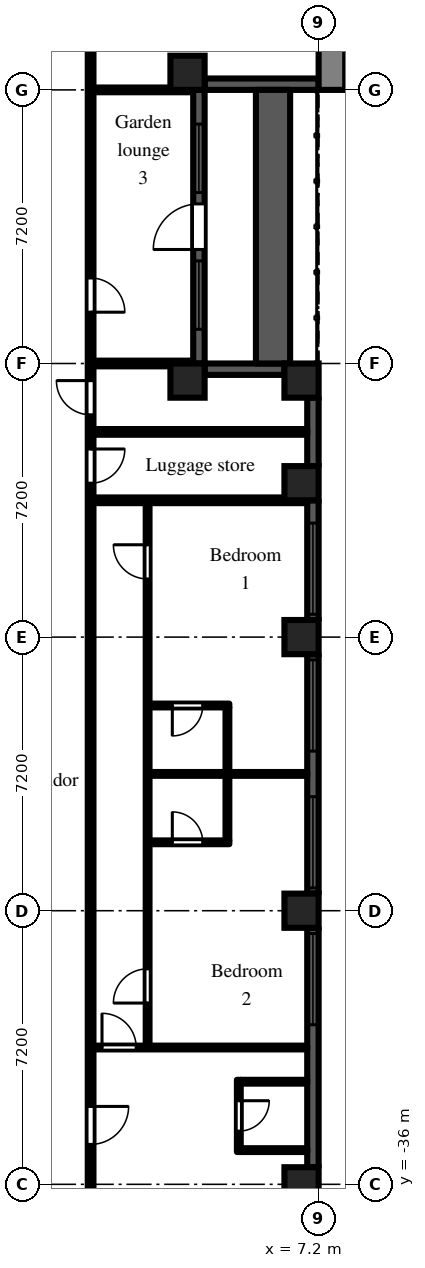
"""IFC4 building model, lengths in metres.
Left out: names, types, materials, properties, quantities, classifications, styles, units other than length and angle.
Written with IfcOpenShell. Run it as: python <this file> out.ifc"""

import sys

from ifc_helpers import new_model, si_unit, direction, frame, frame_2d, origin, origin_2d, place, context, subcontext, project, spatial, rectangle, extrude, element, fill, save


model = new_model("IFC4")
c1 = context("Model", 3, precision=1e-05, world=origin(), true_north=direction((0.0, 1.0)))
c2 = subcontext(c1, "Body", "Model", "MODEL_VIEW")
j1 = project(units=[si_unit("LENGTHUNIT", "METRE"), si_unit("PLANEANGLEUNIT", "RADIAN")], contexts=[c1])
p1 = place(None, origin())
s1 = spatial("IfcSite", under=j1, at=p1, CompositionType="ELEMENT")
p2 = place(p1, origin())
s2 = spatial("IfcBuilding", under=s1, at=p2, CompositionType="ELEMENT")
p3 = place(p2, frame((0.0, 0.0, 102.9)))
s3 = spatial("IfcBuildingStorey", under=s2, at=p3, CompositionType="ELEMENT", Elevation=102.9)
for number, where, z_axis, x_axis in (
    (1, (3.75, -14.85, 0.0), (0.0, 0.0, 1.0), (1.0, 0.0, 0.0)),
    (2, (3.75, -6.75, 0.0), (0.0, 0.0, 1.0), (1.0, 0.0, 0.0)),
    (3, (6.75, -36.0, 0.0), (0.0, 0.0, 1.0), (1.0, 0.0, 0.0)),
    (4, (6.75, -28.8, 0.0), (0.0, 0.0, 1.0), (1.0, 0.0, 0.0)),
    (5, (6.75, -21.6, 0.0), (0.0, 0.0, 1.0), (1.0, 0.0, 0.0)),
    (6, (6.75, -17.55, 0.0), (0.0, 0.0, 1.0), (1.0, 0.0, 0.0)),
    (7, (6.75, -14.85, 0.0), (0.0, 0.0, 1.0), (1.0, 0.0, 0.0)),
):
    element("IfcColumn", number, at=place(p3, frame(where, z_axis=z_axis, x_axis=x_axis)), inside=s3, PredefinedType="COLUMN", context=c2, shape_type="SweptSolid", body=[
        extrude(rectangle(XDim=0.9, YDim=0.9, at=origin_2d()), origin(), (0.0, 0.0, 1.0), 3.0),
    ])
p4 = place(p3, frame((7.05, -35.55, 0.0), z_axis=(0.0, 0.0, 1.0), x_axis=(0.0, 1.0, 0.0)))
e8 = element("IfcWall", 8, at=p4, inside=s3, PredefinedType="SOLIDWALL", context=c2, shape_type="SweptSolid", body=[
    extrude(rectangle(XDim=6.3, YDim=0.3, at=frame_2d((3.15, 0.0))), origin(), (0.0, 0.0, 1.0), 2.1),
])
p5 = place(p4, frame((3.75, 0.0, 0.2)))
e9 = element("IfcOpeningElement", 9, at=p5, cuts=e8, PredefinedType="OPENING", context=c2, shape_type="SweptSolid", body=[
    extrude(rectangle(XDim=2.4, YDim=1.85, at=frame_2d((1.2, 0.925))), frame((0.0, 0.16, 0.0), z_axis=(0.0, -1.0, 0.0), x_axis=(1.0, 0.0, 0.0)), (0.0, 0.0, 1.0), 0.32),
])
p6 = place(p3, frame((7.05, -28.35, 0.0), z_axis=(0.0, 0.0, 1.0), x_axis=(0.0, 1.0, 0.0)))
e10 = element("IfcWall", 10, at=p6, inside=s3, PredefinedType="SOLIDWALL", context=c2, shape_type="SweptSolid", body=[
    extrude(rectangle(XDim=6.3, YDim=0.3, at=frame_2d((3.15, 0.0))), origin(), (0.0, 0.0, 1.0), 2.1),
])
p7 = place(p6, frame((0.15, 0.0, 0.2)))
e11 = element("IfcOpeningElement", 11, at=p7, cuts=e10, PredefinedType="OPENING", context=c2, shape_type="SweptSolid", body=[
    extrude(rectangle(XDim=2.4, YDim=1.85, at=frame_2d((1.2, 0.925))), frame((0.0, 0.16, 0.0), z_axis=(0.0, -1.0, 0.0), x_axis=(1.0, 0.0, 0.0)), (0.0, 0.0, 1.0), 0.32),
])
p8 = place(p6, frame((3.75, 0.0, 0.2)))
e12 = element("IfcOpeningElement", 12, at=p8, cuts=e10, PredefinedType="OPENING", context=c2, shape_type="SweptSolid", body=[
    extrude(rectangle(XDim=2.4, YDim=1.85, at=frame_2d((1.2, 0.925))), frame((0.0, 0.16, 0.0), z_axis=(0.0, -1.0, 0.0), x_axis=(1.0, 0.0, 0.0)), (0.0, 0.0, 1.0), 0.32),
])
p9 = place(p3, frame((7.05, -21.15, 0.0), z_axis=(0.0, 0.0, 1.0), x_axis=(0.0, 1.0, 0.0)))
e13 = element("IfcWall", 13, at=p9, inside=s3, PredefinedType="SOLIDWALL", context=c2, shape_type="SweptSolid", body=[
    extrude(rectangle(XDim=3.15, YDim=0.3, at=frame_2d((1.575, 0.0))), origin(), (0.0, 0.0, 1.0), 2.1),
])
p10 = place(p9, frame((0.15, 0.0, 0.2)))
e14 = element("IfcOpeningElement", 14, at=p10, cuts=e13, PredefinedType="OPENING", context=c2, shape_type="SweptSolid", body=[
    extrude(rectangle(XDim=2.4, YDim=1.85, at=frame_2d((1.2, 0.925))), frame((0.0, 0.16, 0.0), z_axis=(0.0, -1.0, 0.0), x_axis=(1.0, 0.0, 0.0)), (0.0, 0.0, 1.0), 0.32),
])
p11 = place(p3, frame((7.05, -17.1, 0.0), z_axis=(0.0, 0.0, 1.0), x_axis=(0.0, 1.0, 0.0)))
e15 = element("IfcWall", 15, at=p11, inside=s3, PredefinedType="SOLIDWALL", context=c2, shape_type="SweptSolid", body=[
    extrude(rectangle(XDim=1.8, YDim=0.3, at=frame_2d((0.9, 0.0))), origin(), (0.0, 0.0, 1.0), 2.1),
])
p12 = place(p3, frame((6.3, -14.55, 0.0), z_axis=(0.0, 0.0, 1.0), x_axis=(-1.0, 0.0, 0.0)))
e16 = element("IfcWall", 16, at=p12, inside=s3, PredefinedType="SOLIDWALL", context=c2, shape_type="SweptSolid", body=[
    extrude(rectangle(XDim=2.1, YDim=0.3, at=frame_2d((1.05, 0.0))), origin(), (0.0, 0.0, 1.0), 2.1),
])
p13 = place(p3, frame((4.05, -14.4, 0.0), z_axis=(0.0, 0.0, 1.0), x_axis=(0.0, 1.0, 0.0)))
e17 = element("IfcWall", 17, at=p13, inside=s3, PredefinedType="SOLIDWALL", context=c2, shape_type="SweptSolid", body=[
    extrude(rectangle(XDim=7.2, YDim=0.3, at=frame_2d((3.6, 0.0))), origin(), (0.0, 0.0, 1.0), 2.1),
])
p14 = place(p13, frame((3.0, 0.0, 0.0)))
e18 = element("IfcOpeningElement", 18, at=p14, cuts=e17, PredefinedType="OPENING", context=c2, shape_type="SweptSolid", body=[
    extrude(rectangle(XDim=1.2, YDim=2.05, at=frame_2d((0.6, 1.025))), frame((0.0, 0.16, 0.0), z_axis=(0.0, -1.0, 0.0), x_axis=(1.0, 0.0, 0.0)), (0.0, 0.0, 1.0), 0.32),
])
p15 = place(p13, frame((0.9, 0.0, 0.2)))
e19 = element("IfcOpeningElement", 19, at=p15, cuts=e17, PredefinedType="OPENING", context=c2, shape_type="SweptSolid", body=[
    extrude(rectangle(XDim=1.8, YDim=1.85, at=frame_2d((0.9, 0.925))), frame((0.0, 0.16, 0.0), z_axis=(0.0, -1.0, 0.0), x_axis=(1.0, 0.0, 0.0)), (0.0, 0.0, 1.0), 0.32),
])
p16 = place(p13, frame((4.5, 0.0, 0.2)))
e20 = element("IfcOpeningElement", 20, at=p16, cuts=e17, PredefinedType="OPENING", context=c2, shape_type="SweptSolid", body=[
    extrude(rectangle(XDim=1.8, YDim=1.85, at=frame_2d((0.9, 0.925))), frame((0.0, 0.16, 0.0), z_axis=(0.0, -1.0, 0.0), x_axis=(1.0, 0.0, 0.0)), (0.0, 0.0, 1.0), 0.32),
])
p17 = place(p3, frame((4.2, -7.05, 0.0), z_axis=(0.0, 0.0, 1.0), x_axis=(1.0, 0.0, 0.0)))
e21 = element("IfcWall", 21, at=p17, inside=s3, PredefinedType="SOLIDWALL", context=c2, shape_type="SweptSolid", body=[
    extrude(rectangle(XDim=3.0, YDim=0.3, at=frame_2d((1.5, 0.0))), origin(), (0.0, 0.0, 1.0), 2.1),
])
p18 = place(p3, frame((6.0, -14.4, 0.0), z_axis=(0.0, 0.0, 1.0), x_axis=(0.0, 1.0, 0.0)))
e22 = element("IfcWall", 22, at=p18, inside=s3, PredefinedType="PARAPET", context=c2, shape_type="SweptSolid", body=[
    extrude(rectangle(XDim=7.2, YDim=0.9, at=frame_2d((3.6, 0.0))), origin(), (0.0, 0.0, 1.0), 0.8),
])
p19 = place(p3, frame((7.55, -7.2, 0.0), z_axis=(0.0, 0.0, 1.0), x_axis=(0.0, 1.0, 0.0)))
e23 = element("IfcWall", 23, at=p19, inside=s3, PredefinedType="SHEAR", context=c2, shape_type="SweptSolid", body=[
    extrude(rectangle(XDim=14.4, YDim=0.7, at=frame_2d((7.2, 0.0))), origin(), (0.0, 0.0, 1.0), 2.575),
])
p20 = place(p19, frame((6.0, 0.0, 0.0)))
e24 = element("IfcOpeningElement", 24, at=p20, cuts=e23, PredefinedType="OPENING", context=c2, shape_type="SweptSolid", body=[
    extrude(rectangle(XDim=2.4, YDim=2.2, at=frame_2d((1.2, 1.1))), frame((0.0, 0.36, 0.0), z_axis=(0.0, -1.0, 0.0), x_axis=(1.0, 0.0, 0.0)), (0.0, 0.0, 1.0), 0.72),
])
p21 = place(p3, frame((1.2, -36.5, 0.0), z_axis=(0.0, 0.0, 1.0), x_axis=(0.0, 1.0, 0.0)))
e25 = element("IfcWall", 25, at=p21, inside=s3, PredefinedType="PARTITIONING", context=c2, shape_type="SweptSolid", body=[
    extrude(rectangle(XDim=35.375, YDim=0.15, at=frame_2d((17.688, 0.0))), origin(), (0.0, 0.0, 1.0), 2.575),
])
p22 = place(p21, frame((33.65, 0.0, 0.0)))
e26 = element("IfcOpeningElement", 26, at=p22, cuts=e25, PredefinedType="OPENING", context=c2, shape_type="SweptSolid", body=[
    extrude(rectangle(XDim=0.9, YDim=2.1, at=frame_2d((0.45, 1.05))), frame((0.0, 0.085, 0.0), z_axis=(0.0, -1.0, 0.0), x_axis=(1.0, 0.0, 0.0)), (0.0, 0.0, 1.0), 0.17),
])
p23 = place(p21, frame((30.65, 0.0, 0.0)))
e27 = element("IfcOpeningElement", 27, at=p23, cuts=e25, PredefinedType="OPENING", context=c2, shape_type="SweptSolid", body=[
    extrude(rectangle(XDim=0.9, YDim=2.1, at=frame_2d((0.45, 1.05))), frame((0.0, 0.085, 0.0), z_axis=(0.0, -1.0, 0.0), x_axis=(1.0, 0.0, 0.0)), (0.0, 0.0, 1.0), 0.17),
])
p24 = place(p21, frame((23.45, 0.0, 0.0)))
e28 = element("IfcOpeningElement", 28, at=p24, cuts=e25, PredefinedType="OPENING", context=c2, shape_type="SweptSolid", body=[
    extrude(rectangle(XDim=0.9, YDim=2.1, at=frame_2d((0.45, 1.05))), frame((0.0, 0.085, 0.0), z_axis=(0.0, -1.0, 0.0), x_axis=(1.0, 0.0, 0.0)), (0.0, 0.0, 1.0), 0.17),
])
p25 = place(p21, frame((20.75, 0.0, 0.0)))
e29 = element("IfcOpeningElement", 29, at=p25, cuts=e25, PredefinedType="OPENING", context=c2, shape_type="SweptSolid", body=[
    extrude(rectangle(XDim=0.9, YDim=2.1, at=frame_2d((0.45, 1.05))), frame((0.0, 0.085, 0.0), z_axis=(0.0, -1.0, 0.0), x_axis=(1.0, 0.0, 0.0)), (0.0, 0.0, 1.0), 0.17),
])
p26 = place(p21, frame((18.95, 0.0, 0.0)))
e30 = element("IfcOpeningElement", 30, at=p26, cuts=e25, PredefinedType="OPENING", context=c2, shape_type="SweptSolid", body=[
    extrude(rectangle(XDim=0.9, YDim=2.1, at=frame_2d((0.45, 1.05))), frame((0.0, 0.085, 0.0), z_axis=(0.0, -1.0, 0.0), x_axis=(1.0, 0.0, 0.0)), (0.0, 0.0, 1.0), 0.17),
])
p27 = place(p21, frame((1.55, 0.0, 0.0)))
e31 = element("IfcOpeningElement", 31, at=p27, cuts=e25, PredefinedType="OPENING", context=c2, shape_type="SweptSolid", body=[
    extrude(rectangle(XDim=1.0, YDim=2.1, at=frame_2d((0.5, 1.05))), frame((0.0, 0.085, 0.0), z_axis=(0.0, -1.0, 0.0), x_axis=(1.0, 0.0, 0.0)), (0.0, 0.0, 1.0), 0.17),
])
p28 = place(p3, frame((1.275, -32.4, 0.0), z_axis=(0.0, 0.0, 1.0), x_axis=(1.0, 0.0, 0.0)))
e32 = element("IfcWall", 32, at=p28, inside=s3, PredefinedType="PARTITIONING", context=c2, shape_type="SweptSolid", body=[
    extrude(rectangle(XDim=5.625, YDim=0.1, at=frame_2d((2.812, 0.0))), origin(), (0.0, 0.0, 1.0), 2.575),
])
p29 = place(p28, frame((0.225, 0.0, 0.0)))
e33 = element("IfcOpeningElement", 33, at=p29, cuts=e32, PredefinedType="OPENING", context=c2, shape_type="SweptSolid", body=[
    extrude(rectangle(XDim=0.9, YDim=2.1, at=frame_2d((0.45, 1.05))), frame((0.0, 0.06, 0.0), z_axis=(0.0, -1.0, 0.0), x_axis=(1.0, 0.0, 0.0)), (0.0, 0.0, 1.0), 0.12),
])
for number, where, z_axis, x_axis in (
    (34, (1.275, -18.0, 0.0), (0.0, 0.0, 1.0), (1.0, 0.0, 0.0)),
    (35, (1.275, -16.2, 0.0), (0.0, 0.0, 1.0), (1.0, 0.0, 0.0)),
):
    element("IfcWall", number, at=place(p3, frame(where, z_axis=z_axis, x_axis=x_axis)), inside=s3, PredefinedType="PARTITIONING", context=c2, shape_type="SweptSolid", body=[
        extrude(rectangle(XDim=5.625, YDim=0.15, at=frame_2d((2.812, 0.0))), origin(), (0.0, 0.0, 1.0), 2.575),
    ])
p30 = place(p3, frame((1.275, -14.4, 0.0), z_axis=(0.0, 0.0, 1.0), x_axis=(1.0, 0.0, 0.0)))
e36 = element("IfcWall", 36, at=p30, inside=s3, PredefinedType="PARTITIONING", context=c2, shape_type="SweptSolid", body=[
    extrude(rectangle(XDim=2.625, YDim=0.15, at=frame_2d((1.312, 0.0))), origin(), (0.0, 0.0, 1.0), 2.575),
])
p31 = place(p3, frame((1.275, -7.2, 0.0), z_axis=(0.0, 0.0, 1.0), x_axis=(1.0, 0.0, 0.0)))
e37 = element("IfcWall", 37, at=p31, inside=s3, PredefinedType="PARTITIONING", context=c2, shape_type="SweptSolid", body=[
    extrude(rectangle(XDim=2.625, YDim=0.125, at=frame_2d((1.312, 0.0))), origin(), (0.0, 0.0, 1.0), 2.575),
])
p32 = place(p3, frame((2.7, -32.35, 0.0), z_axis=(0.0, 0.0, 1.0), x_axis=(0.0, 1.0, 0.0)))
e38 = element("IfcWall", 38, at=p32, inside=s3, PredefinedType="PARTITIONING", context=c2, shape_type="SweptSolid", body=[
    extrude(rectangle(XDim=14.275, YDim=0.1, at=frame_2d((7.138, 0.0))), origin(), (0.0, 0.0, 1.0), 2.575),
])
p33 = place(p32, frame((1.12, 0.0, 0.0)))
e39 = element("IfcOpeningElement", 39, at=p33, cuts=e38, PredefinedType="OPENING", context=c2, shape_type="SweptSolid", body=[
    extrude(rectangle(XDim=0.9, YDim=2.1, at=frame_2d((0.45, 1.05))), frame((0.0, 0.06, 0.0), z_axis=(0.0, -1.0, 0.0), x_axis=(1.0, 0.0, 0.0)), (0.0, 0.0, 1.0), 0.12),
])
p34 = place(p32, frame((12.28, 0.0, 0.0)))
e40 = element("IfcOpeningElement", 40, at=p34, cuts=e38, PredefinedType="OPENING", context=c2, shape_type="SweptSolid", body=[
    extrude(rectangle(XDim=0.9, YDim=2.1, at=frame_2d((0.45, 1.05))), frame((0.0, 0.06, 0.0), z_axis=(0.0, -1.0, 0.0), x_axis=(1.0, 0.0, 0.0)), (0.0, 0.0, 1.0), 0.12),
])
p35 = place(p3, frame((2.75, -27.0, 0.0), z_axis=(0.0, 0.0, 1.0), x_axis=(1.0, 0.0, 0.0)))
e41 = element("IfcWall", 41, at=p35, inside=s3, PredefinedType="PARTITIONING", context=c2, shape_type="SweptSolid", body=[
    extrude(rectangle(XDim=2.1, YDim=0.1, at=frame_2d((1.05, 0.0))), origin(), (0.0, 0.0, 1.0), 2.575),
])
p36 = place(p35, frame((0.6, 0.0, 0.0)))
e42 = element("IfcOpeningElement", 42, at=p36, cuts=e41, PredefinedType="OPENING", context=c2, shape_type="SweptSolid", body=[
    extrude(rectangle(XDim=0.8, YDim=2.1, at=frame_2d((0.4, 1.05))), frame((0.0, 0.06, 0.0), z_axis=(0.0, -1.0, 0.0), x_axis=(1.0, 0.0, 0.0)), (0.0, 0.0, 1.0), 0.12),
])
p37 = place(p3, frame((2.75, -25.2, 0.0), z_axis=(0.0, 0.0, 1.0), x_axis=(1.0, 0.0, 0.0)))
e43 = element("IfcWall", 43, at=p37, inside=s3, PredefinedType="PARTITIONING", context=c2, shape_type="SweptSolid", body=[
    extrude(rectangle(XDim=4.15, YDim=0.1, at=frame_2d((2.075, 0.0))), origin(), (0.0, 0.0, 1.0), 2.575),
])
p38 = place(p3, frame((2.75, -23.4, 0.0), z_axis=(0.0, 0.0, 1.0), x_axis=(1.0, 0.0, 0.0)))
e44 = element("IfcWall", 44, at=p38, inside=s3, PredefinedType="PARTITIONING", context=c2, shape_type="SweptSolid", body=[
    extrude(rectangle(XDim=2.1, YDim=0.1, at=frame_2d((1.05, 0.0))), origin(), (0.0, 0.0, 1.0), 2.575),
])
p39 = place(p38, frame((0.6, 0.0, 0.0)))
e45 = element("IfcOpeningElement", 45, at=p39, cuts=e44, PredefinedType="OPENING", context=c2, shape_type="SweptSolid", body=[
    extrude(rectangle(XDim=0.8, YDim=2.1, at=frame_2d((0.4, 1.05))), frame((0.0, 0.06, 0.0), z_axis=(0.0, -1.0, 0.0), x_axis=(1.0, 0.0, 0.0)), (0.0, 0.0, 1.0), 0.12),
])
p40 = place(p3, frame((4.8, -26.95, 0.0), z_axis=(0.0, 0.0, 1.0), x_axis=(0.0, 1.0, 0.0)))
e46 = element("IfcWall", 46, at=p40, inside=s3, PredefinedType="PARTITIONING", context=c2, shape_type="SweptSolid", body=[
    extrude(rectangle(XDim=3.5, YDim=0.1, at=frame_2d((1.75, 0.0))), origin(), (0.0, 0.0, 1.0), 2.575),
])
p41 = place(p3, frame((5.1, -35.15, 0.0), z_axis=(0.0, 0.0, 1.0), x_axis=(0.0, 1.0, 0.0)))
e47 = element("IfcWall", 47, at=p41, inside=s3, PredefinedType="PARTITIONING", context=c2, shape_type="SweptSolid", body=[
    extrude(rectangle(XDim=1.9, YDim=0.1, at=frame_2d((0.95, 0.0))), origin(), (0.0, 0.0, 1.0), 2.575),
])
p42 = place(p41, frame((0.55, 0.0, 0.0)))
e48 = element("IfcOpeningElement", 48, at=p42, cuts=e47, PredefinedType="OPENING", context=c2, shape_type="SweptSolid", body=[
    extrude(rectangle(XDim=0.8, YDim=2.1, at=frame_2d((0.4, 1.05))), frame((0.0, 0.06, 0.0), z_axis=(0.0, -1.0, 0.0), x_axis=(1.0, 0.0, 0.0)), (0.0, 0.0, 1.0), 0.12),
])
for number, where, z_axis, x_axis in (
    (49, (5.15, -35.1, 0.0), (0.0, 0.0, 1.0), (1.0, 0.0, 0.0)),
    (50, (5.15, -33.3, 0.0), (0.0, 0.0, 1.0), (1.0, 0.0, 0.0)),
):
    element("IfcWall", number, at=place(p3, frame(where, z_axis=z_axis, x_axis=x_axis)), inside=s3, PredefinedType="PARTITIONING", context=c2, shape_type="SweptSolid", body=[
        extrude(rectangle(XDim=1.75, YDim=0.1, at=frame_2d((0.875, 0.0))), origin(), (0.0, 0.0, 1.0), 2.575),
    ])
p43 = place(p5, origin())
e51 = element("IfcWindow", 51, at=p43, inside=s3, PartitioningType="SINGLE_PANEL", PredefinedType="WINDOW", context=c2, shape_type="SweptSolid", body=[
    extrude(rectangle(XDim=2.4, YDim=1.85, at=frame_2d((1.2, 0.925))), frame((0.0, 0.03, 0.0), z_axis=(0.0, -1.0, 0.0), x_axis=(1.0, 0.0, 0.0)), (0.0, 0.0, 1.0), 0.06),
])
fill(e9, e51)
p44 = place(p7, origin())
e52 = element("IfcWindow", 52, at=p44, inside=s3, PartitioningType="SINGLE_PANEL", PredefinedType="WINDOW", context=c2, shape_type="SweptSolid", body=[
    extrude(rectangle(XDim=2.4, YDim=1.85, at=frame_2d((1.2, 0.925))), frame((0.0, 0.03, 0.0), z_axis=(0.0, -1.0, 0.0), x_axis=(1.0, 0.0, 0.0)), (0.0, 0.0, 1.0), 0.06),
])
fill(e11, e52)
p45 = place(p8, origin())
e53 = element("IfcWindow", 53, at=p45, inside=s3, PartitioningType="SINGLE_PANEL", PredefinedType="WINDOW", context=c2, shape_type="SweptSolid", body=[
    extrude(rectangle(XDim=2.4, YDim=1.85, at=frame_2d((1.2, 0.925))), frame((0.0, 0.03, 0.0), z_axis=(0.0, -1.0, 0.0), x_axis=(1.0, 0.0, 0.0)), (0.0, 0.0, 1.0), 0.06),
])
fill(e12, e53)
p46 = place(p10, origin())
e54 = element("IfcWindow", 54, at=p46, inside=s3, PartitioningType="SINGLE_PANEL", PredefinedType="WINDOW", context=c2, shape_type="SweptSolid", body=[
    extrude(rectangle(XDim=2.4, YDim=1.85, at=frame_2d((1.2, 0.925))), frame((0.0, 0.03, 0.0), z_axis=(0.0, -1.0, 0.0), x_axis=(1.0, 0.0, 0.0)), (0.0, 0.0, 1.0), 0.06),
])
fill(e14, e54)
p47 = place(p14, origin())
e55 = element("IfcDoor", 55, at=p47, inside=s3, OperationType="SINGLE_SWING_LEFT", PredefinedType="DOOR", context=c2, shape_type="SweptSolid", body=[
    extrude(rectangle(XDim=1.2, YDim=2.05, at=frame_2d((0.6, 1.025))), frame((0.0, 0.025, 0.0), z_axis=(0.0, -1.0, 0.0), x_axis=(1.0, 0.0, 0.0)), (0.0, 0.0, 1.0), 0.05),
])
fill(e18, e55)
p48 = place(p15, origin())
e56 = element("IfcWindow", 56, at=p48, inside=s3, PartitioningType="SINGLE_PANEL", PredefinedType="WINDOW", context=c2, shape_type="SweptSolid", body=[
    extrude(rectangle(XDim=1.8, YDim=1.85, at=frame_2d((0.9, 0.925))), frame((0.0, 0.03, 0.0), z_axis=(0.0, -1.0, 0.0), x_axis=(1.0, 0.0, 0.0)), (0.0, 0.0, 1.0), 0.06),
])
fill(e19, e56)
p49 = place(p16, origin())
e57 = element("IfcWindow", 57, at=p49, inside=s3, PartitioningType="SINGLE_PANEL", PredefinedType="WINDOW", context=c2, shape_type="SweptSolid", body=[
    extrude(rectangle(XDim=1.8, YDim=1.85, at=frame_2d((0.9, 0.925))), frame((0.0, 0.03, 0.0), z_axis=(0.0, -1.0, 0.0), x_axis=(1.0, 0.0, 0.0)), (0.0, 0.0, 1.0), 0.06),
])
fill(e20, e57)
p50 = place(p24, frame((0.9, 0.0, 0.0), z_axis=(0.0, 0.0, 1.0), x_axis=(-1.0, 0.0, 0.0)))
e58 = element("IfcDoor", 58, at=p50, inside=s3, OperationType="SINGLE_SWING_RIGHT", PredefinedType="DOOR", context=c2, shape_type="SweptSolid", body=[
    extrude(rectangle(XDim=0.9, YDim=2.1, at=frame_2d((0.45, 1.05))), frame((0.0, 0.025, 0.0), z_axis=(0.0, -1.0, 0.0), x_axis=(1.0, 0.0, 0.0)), (0.0, 0.0, 1.0), 0.05),
])
fill(e28, e58)
p51 = place(p25, origin())
e59 = element("IfcDoor", 59, at=p51, inside=s3, OperationType="SINGLE_SWING_RIGHT", PredefinedType="DOOR", context=c2, shape_type="SweptSolid", body=[
    extrude(rectangle(XDim=0.9, YDim=2.1, at=frame_2d((0.45, 1.05))), frame((0.0, 0.025, 0.0), z_axis=(0.0, -1.0, 0.0), x_axis=(1.0, 0.0, 0.0)), (0.0, 0.0, 1.0), 0.05),
])
fill(e29, e59)
p52 = place(p26, frame((0.9, 0.0, 0.0), z_axis=(0.0, 0.0, 1.0), x_axis=(-1.0, 0.0, 0.0)))
e60 = element("IfcDoor", 60, at=p52, inside=s3, OperationType="SINGLE_SWING_LEFT", PredefinedType="DOOR", context=c2, shape_type="SweptSolid", body=[
    extrude(rectangle(XDim=0.9, YDim=2.1, at=frame_2d((0.45, 1.05))), frame((0.0, 0.025, 0.0), z_axis=(0.0, -1.0, 0.0), x_axis=(1.0, 0.0, 0.0)), (0.0, 0.0, 1.0), 0.05),
])
fill(e30, e60)
p53 = place(p42, frame((0.8, 0.0, 0.0), z_axis=(0.0, 0.0, 1.0), x_axis=(-1.0, 0.0, 0.0)))
e61 = element("IfcDoor", 61, at=p53, inside=s3, OperationType="SINGLE_SWING_LEFT", PredefinedType="DOOR", context=c2, shape_type="SweptSolid", body=[
    extrude(rectangle(XDim=0.8, YDim=2.1, at=frame_2d((0.4, 1.05))), frame((0.0, 0.025, 0.0), z_axis=(0.0, -1.0, 0.0), x_axis=(1.0, 0.0, 0.0)), (0.0, 0.0, 1.0), 0.05),
])
fill(e48, e61)
p54 = place(p27, frame((1.0, 0.0, 0.0), z_axis=(0.0, 0.0, 1.0), x_axis=(-1.0, 0.0, 0.0)))
e62 = element("IfcDoor", 62, at=p54, inside=s3, OperationType="SINGLE_SWING_LEFT", PredefinedType="DOOR", context=c2, shape_type="SweptSolid", body=[
    extrude(rectangle(XDim=1.0, YDim=2.1, at=frame_2d((0.5, 1.05))), frame((0.0, 0.025, 0.0), z_axis=(0.0, -1.0, 0.0), x_axis=(1.0, 0.0, 0.0)), (0.0, 0.0, 1.0), 0.05),
])
fill(e31, e62)
p55 = place(p29, origin())
e63 = element("IfcDoor", 63, at=p55, inside=s3, OperationType="SINGLE_SWING_LEFT", PredefinedType="DOOR", context=c2, shape_type="SweptSolid", body=[
    extrude(rectangle(XDim=0.9, YDim=2.1, at=frame_2d((0.45, 1.05))), frame((0.0, 0.025, 0.0), z_axis=(0.0, -1.0, 0.0), x_axis=(1.0, 0.0, 0.0)), (0.0, 0.0, 1.0), 0.05),
])
fill(e33, e63)
p56 = place(p33, origin())
e64 = element("IfcDoor", 64, at=p56, inside=s3, OperationType="SINGLE_SWING_LEFT", PredefinedType="DOOR", context=c2, shape_type="SweptSolid", body=[
    extrude(rectangle(XDim=0.9, YDim=2.1, at=frame_2d((0.45, 1.05))), frame((0.0, 0.025, 0.0), z_axis=(0.0, -1.0, 0.0), x_axis=(1.0, 0.0, 0.0)), (0.0, 0.0, 1.0), 0.05),
])
fill(e39, e64)
p57 = place(p34, origin())
e65 = element("IfcDoor", 65, at=p57, inside=s3, OperationType="SINGLE_SWING_RIGHT", PredefinedType="DOOR", context=c2, shape_type="SweptSolid", body=[
    extrude(rectangle(XDim=0.9, YDim=2.1, at=frame_2d((0.45, 1.05))), frame((0.0, 0.025, 0.0), z_axis=(0.0, -1.0, 0.0), x_axis=(1.0, 0.0, 0.0)), (0.0, 0.0, 1.0), 0.05),
])
fill(e40, e65)
p58 = place(p39, frame((0.8, 0.0, 0.0), z_axis=(0.0, 0.0, 1.0), x_axis=(-1.0, 0.0, 0.0)))
e66 = element("IfcDoor", 66, at=p58, inside=s3, OperationType="SINGLE_SWING_RIGHT", PredefinedType="DOOR", context=c2, shape_type="SweptSolid", body=[
    extrude(rectangle(XDim=0.8, YDim=2.1, at=frame_2d((0.4, 1.05))), frame((0.0, 0.025, 0.0), z_axis=(0.0, -1.0, 0.0), x_axis=(1.0, 0.0, 0.0)), (0.0, 0.0, 1.0), 0.05),
])
fill(e45, e66)
p59 = place(p36, origin())
e67 = element("IfcDoor", 67, at=p59, inside=s3, OperationType="SINGLE_SWING_LEFT", PredefinedType="DOOR", context=c2, shape_type="SweptSolid", body=[
    extrude(rectangle(XDim=0.8, YDim=2.1, at=frame_2d((0.4, 1.05))), frame((0.0, 0.025, 0.0), z_axis=(0.0, -1.0, 0.0), x_axis=(1.0, 0.0, 0.0)), (0.0, 0.0, 1.0), 0.05),
])
fill(e42, e67)
save(model, sys.argv[1])
